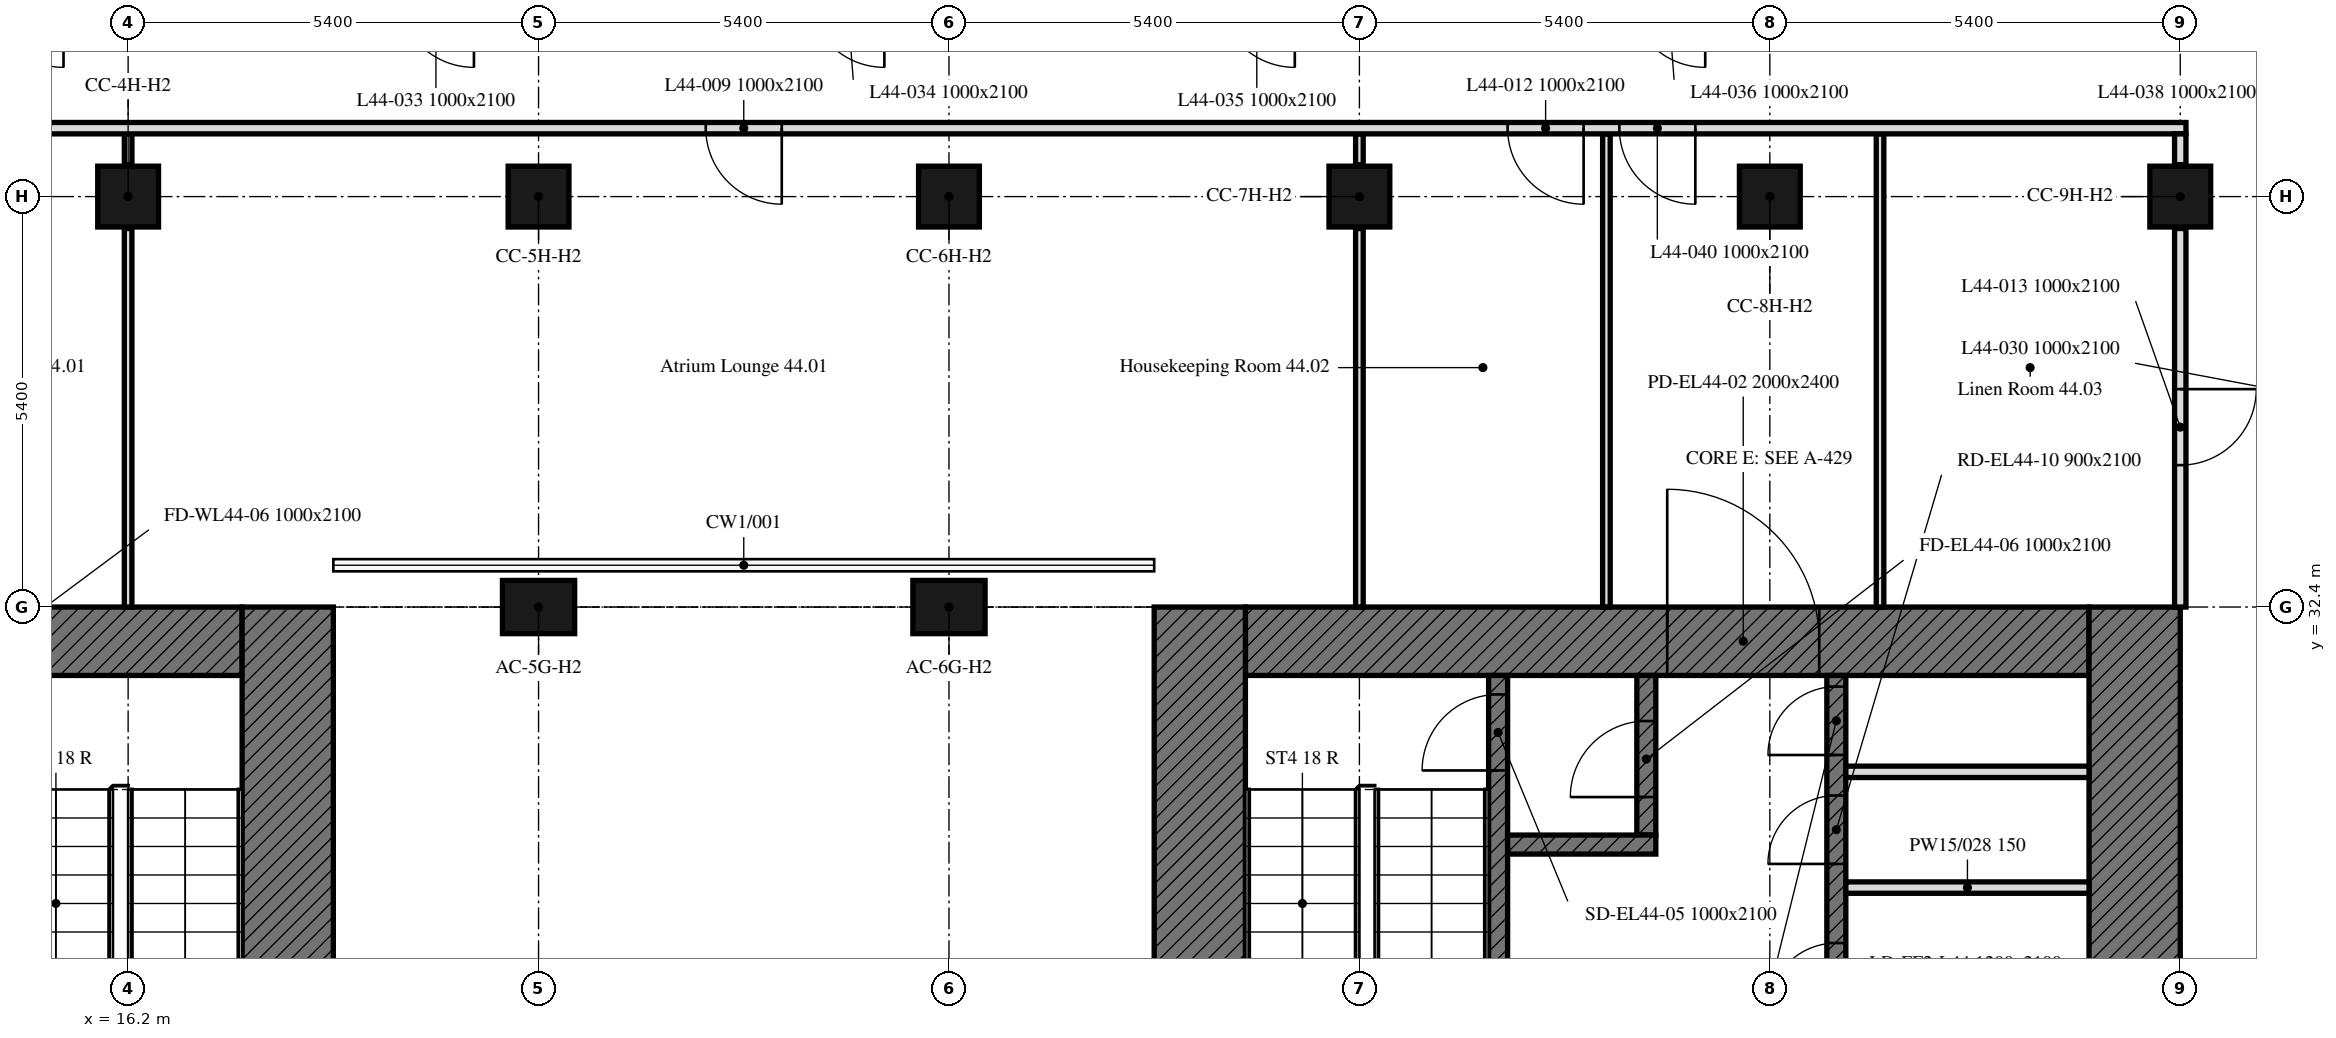
"""IFC4 building model, lengths in metres.
Left out: names, types, materials, properties, quantities, classifications, styles, units other than length and angle.
Written with IfcOpenShell. Run it as: python <this file> out.ifc"""

import sys

from ifc_helpers import new_model, si_unit, direction, frame, frame_2d, origin, origin_2d, place, context, subcontext, project, spatial, rectangle, extrude, element, fill, save


model = new_model("IFC4")
c1 = context("Model", 3, precision=1e-05, world=origin(), true_north=direction((0.0, 1.0)))
c2 = subcontext(c1, "Body", "Model", "MODEL_VIEW")
j1 = project(units=[si_unit("LENGTHUNIT", "METRE"), si_unit("PLANEANGLEUNIT", "RADIAN")], contexts=[c1])
p1 = place(None, origin())
s1 = spatial("IfcSite", under=j1, at=p1, CompositionType="ELEMENT")
p2 = place(p1, origin())
s2 = spatial("IfcBuilding", under=s1, at=p2, CompositionType="ELEMENT")
p3 = place(p2, frame((0.0, 0.0, 184.0)))
s3 = spatial("IfcBuildingStorey", under=s2, at=p3, CompositionType="ELEMENT", Elevation=184.0)
for number, where, z_axis, x_axis in (
    (1, (21.6, 32.4, 0.0), (0.0, 0.0, 1.0), (1.0, 0.0, 0.0)),
    (2, (27.0, 32.4, 0.0), (0.0, 0.0, 1.0), (1.0, 0.0, 0.0)),
):
    element("IfcColumn", number, at=place(p3, frame(where, z_axis=z_axis, x_axis=x_axis)), inside=s3, PredefinedType="COLUMN", context=c2, shape_type="SweptSolid", body=[
        extrude(rectangle(XDim=0.95, YDim=0.7, at=origin_2d()), origin(), (0.0, 0.0, 1.0), 3.0),
    ])
for number, where, z_axis, x_axis in (
    (3, (16.2, 37.8, 0.0), (0.0, 0.0, 1.0), (1.0, 0.0, 0.0)),
    (4, (21.6, 37.8, 0.0), (0.0, 0.0, 1.0), (1.0, 0.0, 0.0)),
    (5, (27.0, 37.8, 0.0), (0.0, 0.0, 1.0), (1.0, 0.0, 0.0)),
    (6, (32.4, 37.8, 0.0), (0.0, 0.0, 1.0), (1.0, 0.0, 0.0)),
    (7, (37.8, 37.8, 0.0), (0.0, 0.0, 1.0), (1.0, 0.0, 0.0)),
    (8, (43.2, 37.8, 0.0), (0.0, 0.0, 1.0), (1.0, 0.0, 0.0)),
):
    element("IfcColumn", number, at=place(p3, frame(where, z_axis=z_axis, x_axis=x_axis)), inside=s3, PredefinedType="COLUMN", context=c2, shape_type="SweptSolid", body=[
        extrude(rectangle(XDim=0.8, YDim=0.8, at=origin_2d()), origin(), (0.0, 0.0, 1.0), 3.0),
    ])
p4 = place(p3, frame((6.6, 31.95, 0.0), z_axis=(0.0, 0.0, 1.0), x_axis=(1.0, 0.0, 0.0)))
e9 = element("IfcWall", 9, at=p4, inside=s3, PredefinedType="SOLIDWALL", context=c2, shape_type="SweptSolid", body=[
    extrude(rectangle(XDim=11.1, YDim=0.9, at=frame_2d((5.55, 0.0))), origin(), (0.0, 0.0, 1.0), 3.0),
])
p5 = place(p4, frame((3.55, 0.0, 0.0)))
e10 = element("IfcOpeningElement", 10, at=p5, cuts=e9, PredefinedType="OPENING", context=c2, shape_type="SweptSolid", body=[
    extrude(rectangle(XDim=2.0, YDim=2.4, at=frame_2d((1.0, 1.2))), frame((0.0, 0.45, 0.0), z_axis=(0.0, -1.0, 0.0), x_axis=(1.0, 0.0, 0.0)), (0.0, 0.0, 1.0), 0.9),
])
p6 = place(p3, frame((18.3, 32.4, 0.0), z_axis=(0.0, 0.0, 1.0), x_axis=(0.0, -1.0, 0.0)))
e11 = element("IfcWall", 11, at=p6, inside=s3, PredefinedType="SOLIDWALL", context=c2, shape_type="SweptSolid", body=[
    extrude(rectangle(XDim=16.2, YDim=1.2, at=frame_2d((8.1, 0.0))), origin(), (0.0, 0.0, 1.0), 3.0),
])
p7 = place(p3, frame((30.9, 31.95, 0.0), z_axis=(0.0, 0.0, 1.0), x_axis=(1.0, 0.0, 0.0)))
e12 = element("IfcWall", 12, at=p7, inside=s3, PredefinedType="SOLIDWALL", context=c2, shape_type="SweptSolid", body=[
    extrude(rectangle(XDim=11.1, YDim=0.9, at=frame_2d((5.55, 0.0))), origin(), (0.0, 0.0, 1.0), 3.0),
])
p8 = place(p7, frame((5.55, 0.0, 0.0)))
e13 = element("IfcOpeningElement", 13, at=p8, cuts=e12, PredefinedType="OPENING", context=c2, shape_type="SweptSolid", body=[
    extrude(rectangle(XDim=2.0, YDim=2.4, at=frame_2d((1.0, 1.2))), frame((0.0, 0.45, 0.0), z_axis=(0.0, -1.0, 0.0), x_axis=(1.0, 0.0, 0.0)), (0.0, 0.0, 1.0), 0.9),
])
for number, where, z_axis, x_axis in (
    (14, (42.6, 32.4, 0.0), (0.0, 0.0, 1.0), (0.0, -1.0, 0.0)),
    (15, (30.3, 16.2, 0.0), (0.0, 0.0, 1.0), (0.0, 1.0, 0.0)),
):
    element("IfcWall", number, at=place(p3, frame(where, z_axis=z_axis, x_axis=x_axis)), inside=s3, PredefinedType="SOLIDWALL", context=c2, shape_type="SweptSolid", body=[
        extrude(rectangle(XDim=16.2, YDim=1.2, at=frame_2d((8.1, 0.0))), origin(), (0.0, 0.0, 1.0), 3.0),
    ])
p9 = place(p3, frame((38.675, 17.1, 0.0), z_axis=(0.0, 0.0, 1.0), x_axis=(0.0, 1.0, 0.0)))
e16 = element("IfcWall", 16, at=p9, inside=s3, PredefinedType="SOLIDWALL", context=c2, shape_type="SweptSolid", body=[
    extrude(rectangle(XDim=14.4, YDim=0.25, at=frame_2d((7.2, 0.0))), origin(), (0.0, 0.0, 1.0), 3.0),
])
p10 = place(p9, frame((4.6, 0.0, 0.0)))
e17 = element("IfcOpeningElement", 17, at=p10, cuts=e16, PredefinedType="OPENING", context=c2, shape_type="SweptSolid", body=[
    extrude(rectangle(XDim=1.0, YDim=2.1, at=frame_2d((0.5, 1.05))), frame((0.0, 0.125, 0.0), z_axis=(0.0, -1.0, 0.0), x_axis=(1.0, 0.0, 0.0)), (0.0, 0.0, 1.0), 0.25),
])
p11 = place(p9, frame((7.062, 0.0, 0.0)))
e18 = element("IfcOpeningElement", 18, at=p11, cuts=e16, PredefinedType="OPENING", context=c2, shape_type="SweptSolid", body=[
    extrude(rectangle(XDim=1.2, YDim=2.1, at=frame_2d((0.6, 1.05))), frame((0.0, 0.125, 0.0), z_axis=(0.0, -1.0, 0.0), x_axis=(1.0, 0.0, 0.0)), (0.0, 0.0, 1.0), 0.25),
])
p12 = place(p9, frame((9.979, 0.0, 0.0)))
e19 = element("IfcOpeningElement", 19, at=p12, cuts=e16, PredefinedType="OPENING", context=c2, shape_type="SweptSolid", body=[
    extrude(rectangle(XDim=0.9, YDim=2.1, at=frame_2d((0.45, 1.05))), frame((0.0, 0.125, 0.0), z_axis=(0.0, -1.0, 0.0), x_axis=(1.0, 0.0, 0.0)), (0.0, 0.0, 1.0), 0.25),
])
p13 = place(p9, frame((11.92, 0.0, 0.0)))
e20 = element("IfcOpeningElement", 20, at=p13, cuts=e16, PredefinedType="OPENING", context=c2, shape_type="SweptSolid", body=[
    extrude(rectangle(XDim=0.9, YDim=2.1, at=frame_2d((0.45, 1.05))), frame((0.0, 0.125, 0.0), z_axis=(0.0, -1.0, 0.0), x_axis=(1.0, 0.0, 0.0)), (0.0, 0.0, 1.0), 0.25),
])
p14 = place(p9, frame((13.354, 0.0, 0.0)))
e21 = element("IfcOpeningElement", 21, at=p14, cuts=e16, PredefinedType="OPENING", context=c2, shape_type="SweptSolid", body=[
    extrude(rectangle(XDim=0.9, YDim=2.1, at=frame_2d((0.45, 1.05))), frame((0.0, 0.125, 0.0), z_axis=(0.0, -1.0, 0.0), x_axis=(1.0, 0.0, 0.0)), (0.0, 0.0, 1.0), 0.25),
])
p15 = place(p3, frame((34.225, 17.1, 0.0), z_axis=(0.0, 0.0, 1.0), x_axis=(0.0, 1.0, 0.0)))
e22 = element("IfcWall", 22, at=p15, inside=s3, PredefinedType="SOLIDWALL", context=c2, shape_type="SweptSolid", body=[
    extrude(rectangle(XDim=14.4, YDim=0.25, at=frame_2d((7.2, 0.0))), origin(), (0.0, 0.0, 1.0), 3.0),
])
p16 = place(p15, frame((13.15, 0.0, 0.0)))
e23 = element("IfcOpeningElement", 23, at=p16, cuts=e22, PredefinedType="OPENING", context=c2, shape_type="SweptSolid", body=[
    extrude(rectangle(XDim=1.0, YDim=2.1, at=frame_2d((0.5, 1.05))), frame((0.0, 0.125, 0.0), z_axis=(0.0, -1.0, 0.0), x_axis=(1.0, 0.0, 0.0)), (0.0, 0.0, 1.0), 0.25),
])
p17 = place(p15, frame((0.6, 0.0, 0.0)))
e24 = element("IfcOpeningElement", 24, at=p17, cuts=e22, PredefinedType="OPENING", context=c2, shape_type="SweptSolid", body=[
    extrude(rectangle(XDim=1.1, YDim=2.1, at=frame_2d((0.55, 1.05))), frame((0.0, 0.125, 0.0), z_axis=(0.0, -1.0, 0.0), x_axis=(1.0, 0.0, 0.0)), (0.0, 0.0, 1.0), 0.25),
])
p18 = place(p15, frame((3.25, 0.0, 0.0)))
e25 = element("IfcOpeningElement", 25, at=p18, cuts=e22, PredefinedType="OPENING", context=c2, shape_type="SweptSolid", body=[
    extrude(rectangle(XDim=0.9, YDim=2.1, at=frame_2d((0.45, 1.05))), frame((0.0, 0.125, 0.0), z_axis=(0.0, -1.0, 0.0), x_axis=(1.0, 0.0, 0.0)), (0.0, 0.0, 1.0), 0.25),
])
p19 = place(p3, frame((36.175, 29.4, 0.0), z_axis=(0.0, 0.0, 1.0), x_axis=(0.0, 1.0, 0.0)))
e26 = element("IfcWall", 26, at=p19, inside=s3, PredefinedType="SOLIDWALL", context=c2, shape_type="SweptSolid", body=[
    extrude(rectangle(XDim=2.1, YDim=0.25, at=frame_2d((1.05, 0.0))), origin(), (0.0, 0.0, 1.0), 3.0),
])
p20 = place(p19, frame((0.5, 0.0, 0.0)))
e27 = element("IfcOpeningElement", 27, at=p20, cuts=e26, PredefinedType="OPENING", context=c2, shape_type="SweptSolid", body=[
    extrude(rectangle(XDim=1.0, YDim=2.1, at=frame_2d((0.5, 1.05))), frame((0.0, 0.125, 0.0), z_axis=(0.0, -1.0, 0.0), x_axis=(1.0, 0.0, 0.0)), (0.0, 0.0, 1.0), 0.25),
])
p21 = place(p3, frame((34.35, 29.275, 0.0), z_axis=(0.0, 0.0, 1.0), x_axis=(1.0, 0.0, 0.0)))
e28 = element("IfcWall", 28, at=p21, inside=s3, PredefinedType="SOLIDWALL", context=c2, shape_type="SweptSolid", body=[
    extrude(rectangle(XDim=1.95, YDim=0.25, at=frame_2d((0.975, 0.0))), origin(), (0.0, 0.0, 1.0), 3.0),
])
for number, where, z_axis, x_axis in (
    (29, (38.8, 28.709, 0.0), (0.0, 0.0, 1.0), (1.0, 0.0, 0.0)),
    (30, (38.8, 30.232, 0.0), (0.0, 0.0, 1.0), (1.0, 0.0, 0.0)),
):
    element("IfcWall", number, at=place(p3, frame(where, z_axis=z_axis, x_axis=x_axis)), inside=s3, PredefinedType="PARTITIONING", context=c2, shape_type="SweptSolid", body=[
        extrude(rectangle(XDim=3.2, YDim=0.15, at=frame_2d((1.6, 0.0))), origin(), (0.0, 0.0, 1.0), 3.0),
    ])
p22 = place(p3, frame((16.2, 38.625, 0.0), z_axis=(0.0, 0.0, 1.0), x_axis=(0.0, -1.0, 0.0)))
e31 = element("IfcWall", 31, at=p22, inside=s3, PredefinedType="PARTITIONING", context=c2, shape_type="SweptSolid", body=[
    extrude(rectangle(XDim=0.405, YDim=0.1, at=frame_2d((0.203, 0.0))), origin(), (0.0, 0.0, 1.0), 2.4),
])
for number, where, z_axis, x_axis in (
    (32, (16.2, 37.38, 0.0), (0.0, 0.0, 1.0), (0.0, -1.0, 0.0)),
    (33, (32.4, 32.4, 0.0), (0.0, 0.0, 1.0), (0.0, 1.0, 0.0)),
):
    element("IfcWall", number, at=place(p3, frame(where, z_axis=z_axis, x_axis=x_axis)), inside=s3, PredefinedType="PARTITIONING", context=c2, shape_type="SweptSolid", body=[
        extrude(rectangle(XDim=4.98, YDim=0.1, at=frame_2d((2.49, 0.0))), origin(), (0.0, 0.0, 1.0), 2.4),
    ])
p23 = place(p3, frame((32.4, 38.22, 0.0), z_axis=(0.0, 0.0, 1.0), x_axis=(0.0, 1.0, 0.0)))
e34 = element("IfcWall", 34, at=p23, inside=s3, PredefinedType="PARTITIONING", context=c2, shape_type="SweptSolid", body=[
    extrude(rectangle(XDim=0.405, YDim=0.1, at=frame_2d((0.203, 0.0))), origin(), (0.0, 0.0, 1.0), 2.4),
])
for number, where, z_axis, x_axis in (
    (35, (35.65, 38.625, 0.0), (0.0, 0.0, 1.0), (0.0, -1.0, 0.0)),
    (36, (39.25, 32.4, 0.0), (0.0, 0.0, 1.0), (0.0, 1.0, 0.0)),
):
    element("IfcWall", number, at=place(p3, frame(where, z_axis=z_axis, x_axis=x_axis)), inside=s3, PredefinedType="PARTITIONING", context=c2, shape_type="SweptSolid", body=[
        extrude(rectangle(XDim=6.225, YDim=0.1, at=frame_2d((3.113, 0.0))), origin(), (0.0, 0.0, 1.0), 2.4),
    ])
p24 = place(p3, frame((43.275, 38.7, 0.0), z_axis=(0.0, 0.0, 1.0), x_axis=(-1.0, 0.0, 0.0)))
e37 = element("IfcWall", 37, at=p24, inside=s3, PredefinedType="PARTITIONING", context=c2, shape_type="SweptSolid", body=[
    extrude(rectangle(XDim=37.124, YDim=0.15, at=frame_2d((18.562, 0.0))), origin(), (0.0, 0.0, 1.0), 2.4),
])
p25 = place(p24, frame((18.475, 0.0, 0.0)))
e38 = element("IfcOpeningElement", 38, at=p25, cuts=e37, PredefinedType="OPENING", context=c2, shape_type="SweptSolid", body=[
    extrude(rectangle(XDim=1.0, YDim=2.1, at=frame_2d((0.5, 1.05))), frame((0.0, 0.075, 0.0), z_axis=(0.0, -1.0, 0.0), x_axis=(1.0, 0.0, 0.0)), (0.0, 0.0, 1.0), 0.15),
])
p26 = place(p24, frame((34.715, 0.0, 0.0)))
e39 = element("IfcOpeningElement", 39, at=p26, cuts=e37, PredefinedType="OPENING", context=c2, shape_type="SweptSolid", body=[
    extrude(rectangle(XDim=1.0, YDim=2.1, at=frame_2d((0.5, 1.05))), frame((0.0, 0.075, 0.0), z_axis=(0.0, -1.0, 0.0), x_axis=(1.0, 0.0, 0.0)), (0.0, 0.0, 1.0), 0.15),
])
p27 = place(p24, frame((7.925, 0.0, 0.0)))
e40 = element("IfcOpeningElement", 40, at=p27, cuts=e37, PredefinedType="OPENING", context=c2, shape_type="SweptSolid", body=[
    extrude(rectangle(XDim=1.0, YDim=2.1, at=frame_2d((0.5, 1.05))), frame((0.0, 0.075, 0.0), z_axis=(0.0, -1.0, 0.0), x_axis=(1.0, 0.0, 0.0)), (0.0, 0.0, 1.0), 0.15),
])
p28 = place(p24, frame((29.025, 0.0, 0.0)))
e41 = element("IfcOpeningElement", 41, at=p28, cuts=e37, PredefinedType="OPENING", context=c2, shape_type="SweptSolid", body=[
    extrude(rectangle(XDim=1.0, YDim=2.1, at=frame_2d((0.5, 1.05))), frame((0.0, 0.075, 0.0), z_axis=(0.0, -1.0, 0.0), x_axis=(1.0, 0.0, 0.0)), (0.0, 0.0, 1.0), 0.15),
])
p29 = place(p24, frame((30.495, 0.0, 0.0)))
e42 = element("IfcOpeningElement", 42, at=p29, cuts=e37, PredefinedType="OPENING", context=c2, shape_type="SweptSolid", body=[
    extrude(rectangle(XDim=1.0, YDim=2.1, at=frame_2d((0.5, 1.05))), frame((0.0, 0.075, 0.0), z_axis=(0.0, -1.0, 0.0), x_axis=(1.0, 0.0, 0.0)), (0.0, 0.0, 1.0), 0.15),
])
p30 = place(p24, frame((6.455, 0.0, 0.0)))
e43 = element("IfcOpeningElement", 43, at=p30, cuts=e37, PredefinedType="OPENING", context=c2, shape_type="SweptSolid", body=[
    extrude(rectangle(XDim=1.0, YDim=2.1, at=frame_2d((0.5, 1.05))), frame((0.0, 0.075, 0.0), z_axis=(0.0, -1.0, 0.0), x_axis=(1.0, 0.0, 0.0)), (0.0, 0.0, 1.0), 0.15),
])
p31 = place(p3, frame((43.2, 38.625, 0.0), z_axis=(0.0, 0.0, 1.0), x_axis=(0.0, -1.0, 0.0)))
e44 = element("IfcWall", 44, at=p31, inside=s3, PredefinedType="PARTITIONING", context=c2, shape_type="SweptSolid", body=[
    extrude(rectangle(XDim=0.405, YDim=0.15, at=frame_2d((0.203, 0.0))), origin(), (0.0, 0.0, 1.0), 3.0),
])
p32 = place(p3, frame((43.2, 37.38, 0.0), z_axis=(0.0, 0.0, 1.0), x_axis=(0.0, -1.0, 0.0)))
e45 = element("IfcWall", 45, at=p32, inside=s3, PredefinedType="PARTITIONING", context=c2, shape_type="SweptSolid", body=[
    extrude(rectangle(XDim=4.98, YDim=0.15, at=frame_2d((2.49, 0.0))), origin(), (0.0, 0.0, 1.0), 3.0),
])
p33 = place(p32, frame((2.113, 0.0, 0.0)))
e46 = element("IfcOpeningElement", 46, at=p33, cuts=e45, PredefinedType="OPENING", context=c2, shape_type="SweptSolid", body=[
    extrude(rectangle(XDim=1.0, YDim=2.1, at=frame_2d((0.5, 1.05))), frame((0.0, 0.075, 0.0), z_axis=(0.0, -1.0, 0.0), x_axis=(1.0, 0.0, 0.0)), (0.0, 0.0, 1.0), 0.15),
])
p34 = place(p8, origin())
e47 = element("IfcDoor", 47, at=p34, inside=s3, OperationType="DOUBLE_DOOR_SINGLE_SWING", PredefinedType="DOOR", context=c2, shape_type="SweptSolid", body=[
    extrude(rectangle(XDim=2.0, YDim=2.4, at=frame_2d((1.0, 1.2))), frame((0.0, 0.025, 0.0), z_axis=(0.0, -1.0, 0.0), x_axis=(1.0, 0.0, 0.0)), (0.0, 0.0, 1.0), 0.05),
])
fill(e13, e47)
p35 = place(p16, origin())
e48 = element("IfcDoor", 48, at=p35, inside=s3, OperationType="SINGLE_SWING_LEFT", PredefinedType="DOOR", context=c2, shape_type="SweptSolid", body=[
    extrude(rectangle(XDim=1.0, YDim=2.1, at=frame_2d((0.5, 1.05))), frame((0.0, 0.025, 0.0), z_axis=(0.0, -1.0, 0.0), x_axis=(1.0, 0.0, 0.0)), (0.0, 0.0, 1.0), 0.05),
])
fill(e23, e48)
p36 = place(p20, origin())
e49 = element("IfcDoor", 49, at=p36, inside=s3, OperationType="SINGLE_SWING_LEFT", PredefinedType="DOOR", context=c2, shape_type="SweptSolid", body=[
    extrude(rectangle(XDim=1.0, YDim=2.1, at=frame_2d((0.5, 1.05))), frame((0.0, 0.025, 0.0), z_axis=(0.0, -1.0, 0.0), x_axis=(1.0, 0.0, 0.0)), (0.0, 0.0, 1.0), 0.05),
])
fill(e27, e49)
p37 = place(p12, origin())
e50 = element("IfcDoor", 50, at=p37, inside=s3, OperationType="SINGLE_SWING_LEFT", PredefinedType="DOOR", context=c2, shape_type="SweptSolid", body=[
    extrude(rectangle(XDim=0.9, YDim=2.1, at=frame_2d((0.45, 1.05))), frame((0.0, 0.025, 0.0), z_axis=(0.0, -1.0, 0.0), x_axis=(1.0, 0.0, 0.0)), (0.0, 0.0, 1.0), 0.05),
])
fill(e19, e50)
p38 = place(p13, origin())
e51 = element("IfcDoor", 51, at=p38, inside=s3, OperationType="SINGLE_SWING_LEFT", PredefinedType="DOOR", context=c2, shape_type="SweptSolid", body=[
    extrude(rectangle(XDim=0.9, YDim=2.1, at=frame_2d((0.45, 1.05))), frame((0.0, 0.025, 0.0), z_axis=(0.0, -1.0, 0.0), x_axis=(1.0, 0.0, 0.0)), (0.0, 0.0, 1.0), 0.05),
])
fill(e20, e51)
p39 = place(p14, origin())
e52 = element("IfcDoor", 52, at=p39, inside=s3, OperationType="SINGLE_SWING_LEFT", PredefinedType="DOOR", context=c2, shape_type="SweptSolid", body=[
    extrude(rectangle(XDim=0.9, YDim=2.1, at=frame_2d((0.45, 1.05))), frame((0.0, 0.025, 0.0), z_axis=(0.0, -1.0, 0.0), x_axis=(1.0, 0.0, 0.0)), (0.0, 0.0, 1.0), 0.05),
])
fill(e21, e52)
p40 = place(p25, origin())
e53 = element("IfcDoor", 53, at=p40, inside=s3, OperationType="SINGLE_SWING_RIGHT", PredefinedType="DOOR", context=c2, shape_type="SweptSolid", body=[
    extrude(rectangle(XDim=1.0, YDim=2.1, at=frame_2d((0.5, 1.05))), frame((0.0, 0.025, 0.0), z_axis=(0.0, -1.0, 0.0), x_axis=(1.0, 0.0, 0.0)), (0.0, 0.0, 1.0), 0.05),
])
fill(e38, e53)
p41 = place(p27, origin())
e54 = element("IfcDoor", 54, at=p41, inside=s3, OperationType="SINGLE_SWING_RIGHT", PredefinedType="DOOR", context=c2, shape_type="SweptSolid", body=[
    extrude(rectangle(XDim=1.0, YDim=2.1, at=frame_2d((0.5, 1.05))), frame((0.0, 0.025, 0.0), z_axis=(0.0, -1.0, 0.0), x_axis=(1.0, 0.0, 0.0)), (0.0, 0.0, 1.0), 0.05),
])
fill(e40, e54)
p42 = place(p33, origin())
e55 = element("IfcDoor", 55, at=p42, inside=s3, OperationType="SINGLE_SWING_LEFT", PredefinedType="DOOR", context=c2, shape_type="SweptSolid", body=[
    extrude(rectangle(XDim=1.0, YDim=2.1, at=frame_2d((0.5, 1.05))), frame((0.0, 0.025, 0.0), z_axis=(0.0, -1.0, 0.0), x_axis=(1.0, 0.0, 0.0)), (0.0, 0.0, 1.0), 0.05),
])
fill(e46, e55)
p43 = place(p30, origin())
e56 = element("IfcDoor", 56, at=p43, inside=s3, OperationType="SINGLE_SWING_LEFT", PredefinedType="DOOR", context=c2, shape_type="SweptSolid", body=[
    extrude(rectangle(XDim=1.0, YDim=2.1, at=frame_2d((0.5, 1.05))), frame((0.0, 0.025, 0.0), z_axis=(0.0, -1.0, 0.0), x_axis=(1.0, 0.0, 0.0)), (0.0, 0.0, 1.0), 0.05),
])
fill(e43, e56)
save(model, sys.argv[1])
